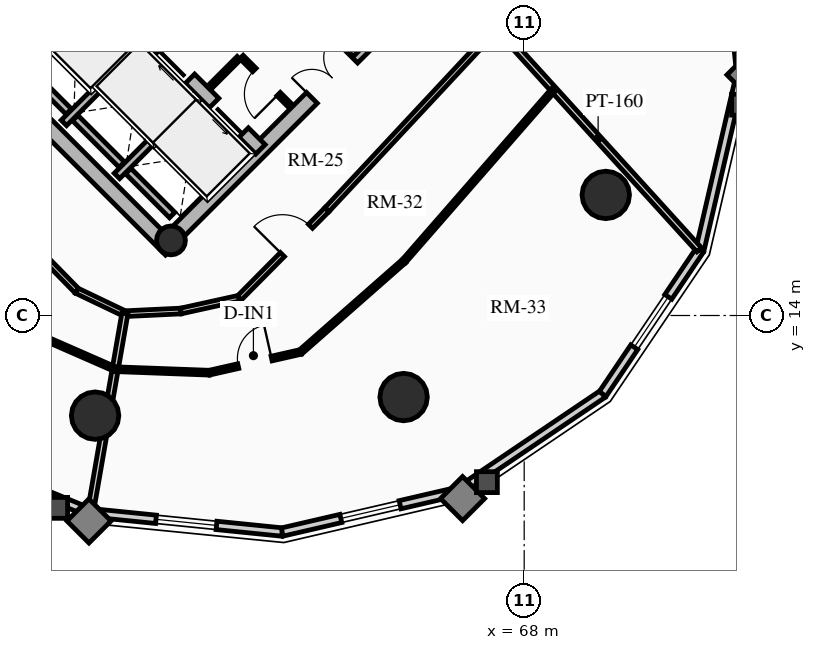
"""IFC4 building model, lengths in metres.
Left out: names, types, materials, properties, quantities, classifications, styles, units other than length and angle.
Written with IfcOpenShell. Run it as: python <this file> out.ifc"""

import sys

from ifc_helpers import new_model, si_unit, direction, frame, frame_2d, origin, origin_2d, place, context, subcontext, project, spatial, rectangle, circle, hollow_circle, extrude, source, transform, mapped, element, fill, save


model = new_model("IFC4")
c1 = context("Model", 3, precision=1e-05, world=origin(), true_north=direction((0.0, 1.0)))
c2 = subcontext(c1, "Body", "Model", "MODEL_VIEW")
j1 = project(units=[si_unit("LENGTHUNIT", "METRE"), si_unit("PLANEANGLEUNIT", "RADIAN")], contexts=[c1])
p1 = place(None, origin())
s1 = spatial("IfcSite", under=j1, at=p1, CompositionType="ELEMENT")
p2 = place(p1, origin())
s2 = spatial("IfcBuilding", under=s1, at=p2, CompositionType="ELEMENT")
p3 = place(p2, frame((0.0, 0.0, 160.33)))
s3 = spatial("IfcBuildingStorey", under=s2, at=p3, CompositionType="ELEMENT", Elevation=160.33)
p4 = place(p3, frame((58.702, 15.732, 0.0), z_axis=(0.0, 0.0, 1.0), x_axis=(-0.707106781187, 0.707106781187, 0.0)))
e1 = element("IfcWall", 1, at=p4, inside=s3, PredefinedType="SHEAR", context=c2, shape_type="SweptSolid", body=[
    extrude(rectangle(XDim=14.1, YDim=0.4, at=frame_2d((7.05, 0.0))), origin(), (0.0, 0.0, 1.0), 2.91),
])
p5 = place(p3, frame((58.561, 15.873, 0.0), z_axis=(0.0, 0.0, 1.0), x_axis=(0.707106781187, 0.707106781187, 0.0)))
e2 = element("IfcWall", 2, at=p5, inside=s3, PredefinedType="SHEAR", context=c2, shape_type="SweptSolid", body=[
    extrude(rectangle(XDim=10.7, YDim=0.4, at=frame_2d((5.35, 0.0))), origin(), (0.0, 0.0, 1.0), 2.91),
])
m1 = source(origin(), c2, "Body", "SweptSolid", [
    extrude(rectangle(XDim=1.5, YDim=2.02, at=frame_2d((0.75, 1.01))), frame((0.0, 0.21, 0.0), z_axis=(0.0, -1.0, 0.0), x_axis=(1.0, 0.0, 0.0)), (0.0, 0.0, 1.0), 0.42),
])
p6 = place(p5, frame((5.45, 0.0, 0.0)))
e3 = element("IfcOpeningElement", 3, at=p6, cuts=e2, PredefinedType="OPENING", context=c2, shape_type="MappedRepresentation", body=[
    mapped(m1, transform((0.0, 0.0, 0.0), x_axis=(1.0, 0.0, 0.0), y_axis=(0.0, 1.0, 0.0), z_axis=(0.0, 0.0, 1.0), scale=1.0)),
])
p7 = place(p3, frame((61.06, 18.373, 0.0), z_axis=(0.0, 0.0, 1.0), x_axis=(-0.707106781187, 0.707106781187, 0.0)))
e4 = element("IfcWall", 4, at=p7, inside=s3, PredefinedType="SHEAR", context=c2, shape_type="SweptSolid", body=[
    extrude(rectangle(XDim=13.7, YDim=0.35, at=frame_2d((6.85, 0.0))), origin(), (0.0, 0.0, 1.0), 2.91),
])
m2 = source(origin(), c2, "Body", "SweptSolid", [
    extrude(rectangle(XDim=1.1, YDim=2.015, at=frame_2d((0.55, 1.007))), frame((0.0, 0.185, 0.0), z_axis=(0.0, -1.0, 0.0), x_axis=(1.0, 0.0, 0.0)), (0.0, 0.0, 1.0), 0.37),
])
p8 = place(p7, frame((4.85, 0.0, 0.0)))
e5 = element("IfcOpeningElement", 5, at=p8, cuts=e4, PredefinedType="OPENING", context=c2, shape_type="MappedRepresentation", body=[
    mapped(m2, transform((0.0, 0.0, 0.0), x_axis=(1.0, 0.0, 0.0), y_axis=(0.0, 1.0, 0.0), z_axis=(0.0, 0.0, 1.0), scale=1.0)),
])
p9 = place(p7, frame((0.625, 0.0, 0.0)))
e6 = element("IfcOpeningElement", 6, at=p9, cuts=e4, PredefinedType="OPENING", context=c2, shape_type="MappedRepresentation", body=[
    mapped(m2, transform((0.0, 0.0, 0.0), x_axis=(1.0, 0.0, 0.0), y_axis=(0.0, 1.0, 0.0), z_axis=(0.0, 0.0, 1.0), scale=1.0)),
])
p10 = place(p7, frame((2.625, 0.0, 0.0)))
e7 = element("IfcOpeningElement", 7, at=p10, cuts=e4, PredefinedType="OPENING", context=c2, shape_type="MappedRepresentation", body=[
    mapped(m2, transform((0.0, 0.0, 0.0), x_axis=(1.0, 0.0, 0.0), y_axis=(0.0, 1.0, 0.0), z_axis=(0.0, 0.0, 1.0), scale=1.0)),
])
m3 = source(origin(), c2, "Body", "SweptSolid", [
    extrude(rectangle(XDim=1.15, YDim=2.02, at=frame_2d((0.575, 1.01))), frame((0.0, 0.185, 0.0), z_axis=(0.0, -1.0, 0.0), x_axis=(1.0, 0.0, 0.0)), (0.0, 0.0, 1.0), 0.37),
])
p11 = place(p7, frame((7.27, 0.0, 0.0)))
e8 = element("IfcOpeningElement", 8, at=p11, cuts=e4, PredefinedType="OPENING", context=c2, shape_type="MappedRepresentation", body=[
    mapped(m3, transform((0.0, 0.0, 0.0), x_axis=(1.0, 0.0, 0.0), y_axis=(0.0, 1.0, 0.0), z_axis=(0.0, 0.0, 1.0), scale=1.0)),
])
p12 = place(p3, frame((63.627, 20.94, 0.0), z_axis=(0.0, 0.0, 1.0), x_axis=(-0.707119496762, 0.707094065383, 0.0)))
e9 = element("IfcWall", 9, at=p12, inside=s3, PredefinedType="SHEAR", context=c2, shape_type="SweptSolid", body=[
    extrude(rectangle(XDim=9.6, YDim=0.35, at=frame_2d((4.8, 0.0))), origin(), (0.0, 0.0, 1.0), 2.91),
])
p13 = place(p12, frame((5.28, 0.0, 0.0)))
e10 = element("IfcOpeningElement", 10, at=p13, cuts=e9, PredefinedType="OPENING", context=c2, shape_type="MappedRepresentation", body=[
    mapped(m3, transform((0.0, 0.0, 0.0), x_axis=(1.0, 0.0, 0.0), y_axis=(0.0, 1.0, 0.0), z_axis=(0.0, 0.0, 1.0), scale=1.0)),
])
p14 = place(p3, frame((53.784, 21.003, 0.0), z_axis=(0.0, 0.0, 1.0), x_axis=(0.707106781187, 0.707106781187, 0.0)))
e11 = element("IfcWall", 11, at=p14, inside=s3, PredefinedType="SHEAR", context=c2, shape_type="SweptSolid", body=[
    extrude(rectangle(XDim=3.285, YDim=0.35, at=frame_2d((1.643, 0.0))), origin(), (0.0, 0.0, 1.0), 2.91),
])
p15 = place(p3, frame((58.706, 15.976, 0.0), z_axis=(0.0, 0.0, 1.0), x_axis=(0.707106781187, 0.707106781187, 0.0)))
e12 = element("IfcColumn", 12, at=p15, inside=s3, PredefinedType="COLUMN", context=c2, shape_type="SweptSolid", body=[
    extrude(hollow_circle(Radius=0.38, WallThickness=0.032, at=origin_2d()), origin(), (0.0, 0.0, 1.0), 2.91),
])
for number, where, z_axis, x_axis in (
    (13, (56.709, 11.365, 0.0), (0.0, 0.0, 1.0), (1.0, 0.0, 0.0)),
    (14, (64.827, 11.854, 0.0), (0.0, 0.0, 1.0), (1.0, 0.0, 0.0)),
    (15, (70.146, 17.173, 0.0), (0.0, 0.0, 1.0), (1.0, 0.0, 0.0)),
):
    element("IfcColumn", number, at=place(p3, frame(where, z_axis=z_axis, x_axis=x_axis)), inside=s3, PredefinedType="USERDEFINED", context=c2, shape_type="SweptSolid", body=[
        extrude(circle(Radius=0.625, at=origin_2d()), origin(), (0.0, 0.0, 1.0), 2.91),
    ])
p16 = place(p3, frame((56.582, 8.811, 0.0), z_axis=(0.0, 0.0, 1.0), x_axis=(-0.924528197738, 0.38111364655, 0.0)))
e16 = element("IfcWall", 16, at=p16, inside=s3, PredefinedType="SOLIDWALL", context=c2, shape_type="SweptSolid", body=[
    extrude(rectangle(XDim=5.366, YDim=0.22, at=frame_2d((2.683, 0.0))), origin(), (0.0, 0.0, 1.0), 2.245),
])
p17 = place(p3, frame((61.633, 8.302, 0.0), z_axis=(0.0, 0.0, 1.0), x_axis=(-0.994959267396, 0.100279889424, 0.0)))
e17 = element("IfcWall", 17, at=p17, inside=s3, PredefinedType="SOLIDWALL", context=c2, shape_type="SweptSolid", body=[
    extrude(rectangle(XDim=5.076, YDim=0.22, at=frame_2d((2.538, 0.0))), origin(), (0.0, 0.0, 1.0), 2.245),
])
m4 = source(origin(), c2, "Body", "SweptSolid", [
    extrude(rectangle(XDim=1.6, YDim=1.3, at=frame_2d((0.8, 0.65))), frame((0.0, 0.12, 0.0), z_axis=(0.0, -1.0, 0.0), x_axis=(1.0, 0.0, 0.0)), (0.0, 0.0, 1.0), 0.24),
])
p18 = place(p17, frame((1.738, 0.0, 0.65)))
e18 = element("IfcOpeningElement", 18, at=p18, cuts=e17, PredefinedType="OPENING", context=c2, shape_type="MappedRepresentation", body=[
    mapped(m4, transform((0.0, 0.0, 0.0), x_axis=(1.0, 0.0, 0.0), y_axis=(0.0, 1.0, 0.0), z_axis=(0.0, 0.0, 1.0), scale=1.0)),
])
p19 = place(p3, frame((66.279, 9.378, 0.0), z_axis=(0.0, 0.0, 1.0), x_axis=(-0.974206226622, -0.225659540039, 0.0)))
e19 = element("IfcWall", 19, at=p19, inside=s3, PredefinedType="SOLIDWALL", context=c2, shape_type="SweptSolid", body=[
    extrude(rectangle(XDim=4.769, YDim=0.22, at=frame_2d((2.385, 0.0))), origin(), (0.0, 0.0, 1.0), 2.245),
])
p20 = place(p19, frame((1.585, 0.0, 0.65)))
e20 = element("IfcOpeningElement", 20, at=p20, cuts=e19, PredefinedType="OPENING", context=c2, shape_type="MappedRepresentation", body=[
    mapped(m4, transform((0.0, 0.0, 0.0), x_axis=(1.0, 0.0, 0.0), y_axis=(0.0, 1.0, 0.0), z_axis=(0.0, 0.0, 1.0), scale=1.0)),
])
p21 = place(p3, frame((70.065, 11.935, 0.0), z_axis=(0.0, 0.0, 1.0), x_axis=(-0.828739009952, -0.559635286042, 0.0)))
e21 = element("IfcWall", 21, at=p21, inside=s3, PredefinedType="SOLIDWALL", context=c2, shape_type="SweptSolid", body=[
    extrude(rectangle(XDim=4.569, YDim=0.22, at=frame_2d((2.284, 0.0))), origin(), (0.0, 0.0, 1.0), 2.245),
])
p22 = place(p3, frame((72.622, 15.721, 0.0), z_axis=(0.0, 0.0, 1.0), x_axis=(-0.559635286042, -0.828739009952, 0.0)))
e22 = element("IfcWall", 22, at=p22, inside=s3, PredefinedType="SOLIDWALL", context=c2, shape_type="SweptSolid", body=[
    extrude(rectangle(XDim=4.569, YDim=0.22, at=frame_2d((2.284, 0.0))), origin(), (0.0, 0.0, 1.0), 2.245),
])
p23 = place(p22, frame((1.484, 0.0, 0.65)))
e23 = element("IfcOpeningElement", 23, at=p23, cuts=e22, PredefinedType="OPENING", context=c2, shape_type="MappedRepresentation", body=[
    mapped(m4, transform((0.0, 0.0, 0.0), x_axis=(1.0, 0.0, 0.0), y_axis=(0.0, 1.0, 0.0), z_axis=(0.0, 0.0, 1.0), scale=1.0)),
])
p24 = place(p3, frame((73.698, 20.367, 0.0), z_axis=(0.0, 0.0, 1.0), x_axis=(-0.225659540039, -0.974206226622, 0.0)))
e24 = element("IfcWall", 24, at=p24, inside=s3, PredefinedType="SOLIDWALL", context=c2, shape_type="SweptSolid", body=[
    extrude(rectangle(XDim=4.769, YDim=0.22, at=frame_2d((2.385, 0.0))), origin(), (0.0, 0.0, 1.0), 2.245),
])
p25 = place(p3, frame((73.189, 25.418, 0.0), z_axis=(0.0, 0.0, 1.0), x_axis=(0.100279889424, -0.994959267396, 0.0)))
e25 = element("IfcWall", 25, at=p25, inside=s3, PredefinedType="SOLIDWALL", context=c2, shape_type="SweptSolid", body=[
    extrude(rectangle(XDim=5.076, YDim=0.22, at=frame_2d((2.538, 0.0))), origin(), (0.0, 0.0, 1.0), 2.245),
])
m5 = source(origin(), c2, "Body", "SweptSolid", [
    extrude(rectangle(XDim=1.15, YDim=2.005, at=frame_2d((0.575, 1.002))), frame((0.0, 0.12, 0.0), z_axis=(0.0, -1.0, 0.0), x_axis=(1.0, 0.0, 0.0)), (0.0, 0.0, 1.0), 0.24),
])
p26 = place(p25, frame((1.963, 0.0, 0.0)))
e26 = element("IfcOpeningElement", 26, at=p26, cuts=e25, PredefinedType="OPENING", context=c2, shape_type="MappedRepresentation", body=[
    mapped(m5, transform((0.0, 0.0, 0.0), x_axis=(1.0, 0.0, 0.0), y_axis=(0.0, 1.0, 0.0), z_axis=(0.0, 0.0, 1.0), scale=1.0)),
])
p27 = place(p3, frame((55.888, 19.069, 0.0), z_axis=(0.0, 0.0, 1.0), x_axis=(0.707106781187, 0.707106781187, 0.0)))
e27 = element("IfcWall", 27, at=p27, inside=s3, PredefinedType="SHEAR", context=c2, shape_type="SweptSolid", body=[
    extrude(rectangle(XDim=2.97, YDim=0.2, at=frame_2d((1.485, 0.0))), origin(), (0.0, 0.0, 1.0), 2.91),
])
p28 = place(p3, frame((56.015, 19.366, 0.0), z_axis=(0.0, 0.0, 1.0), x_axis=(-0.707106781187, 0.707106781187, 0.0)))
e28 = element("IfcWall", 28, at=p28, inside=s3, PredefinedType="SHEAR", context=c2, shape_type="SweptSolid", body=[
    extrude(rectangle(XDim=2.44, YDim=0.2, at=frame_2d((1.22, 0.0))), origin(), (0.0, 0.0, 1.0), 2.91),
])
p29 = place(p3, frame((57.284, 17.673, 0.0), z_axis=(0.0, 0.0, 1.0), x_axis=(0.707147878904, 0.70706568108, 0.0)))
e29 = element("IfcWall", 29, at=p29, inside=s3, PredefinedType="SHEAR", context=c2, shape_type="SweptSolid", body=[
    extrude(rectangle(XDim=2.97, YDim=0.2, at=frame_2d((1.485, 0.0))), origin(), (0.0, 0.0, 1.0), 2.91),
])
p30 = place(p3, frame((57.412, 17.97, 0.0), z_axis=(0.0, 0.0, 1.0), x_axis=(-0.707106781187, 0.707106781187, 0.0)))
e30 = element("IfcWall", 30, at=p30, inside=s3, PredefinedType="SHEAR", context=c2, shape_type="SweptSolid", body=[
    extrude(rectangle(XDim=1.735, YDim=0.2, at=frame_2d((0.867, 0.0))), origin(), (0.0, 0.0, 1.0), 2.91),
])
p31 = place(p3, frame((58.737, 16.644, 0.0), z_axis=(0.0, 0.0, 1.0), x_axis=(-0.707032117043, 0.707181437447, 0.0)))
e31 = element("IfcWall", 31, at=p31, inside=s3, PredefinedType="SHEAR", context=c2, shape_type="SweptSolid", body=[
    extrude(rectangle(XDim=1.635, YDim=0.2, at=frame_2d((0.817, 0.0))), origin(), (0.0, 0.0, 1.0), 2.91),
])
p32 = place(p3, frame((61.835, 19.529, 0.0), z_axis=(0.0, 0.0, 1.0), x_axis=(-0.707174592913, 0.707038962956, 0.0)))
e32 = element("IfcWall", 32, at=p32, inside=s3, PredefinedType="PARTITIONING", context=c2, shape_type="SweptSolid", body=[
    extrude(rectangle(XDim=1.8, YDim=0.125, at=frame_2d((0.9, 0.0))), origin(), (0.0, 0.0, 1.0), 2.675),
])
m6 = source(origin(), c2, "Body", "SweptSolid", [
    extrude(rectangle(XDim=0.9, YDim=2.005, at=frame_2d((0.45, 1.002))), frame((0.0, 0.073, 0.0), z_axis=(0.0, -1.0, 0.0), x_axis=(1.0, 0.0, 0.0)), (0.0, 0.0, 1.0), 0.145),
])
p33 = place(p32, frame((0.42, 0.0, 0.0)))
e33 = element("IfcOpeningElement", 33, at=p33, cuts=e32, PredefinedType="OPENING", context=c2, shape_type="MappedRepresentation", body=[
    mapped(m6, transform((0.0, 0.0, 0.0), x_axis=(1.0, 0.0, 0.0), y_axis=(0.0, 1.0, 0.0), z_axis=(0.0, 0.0, 1.0), scale=1.0)),
])
p34 = place(p3, frame((59.713, 19.996, 0.0), z_axis=(0.0, 0.0, 1.0), x_axis=(0.707217726, 0.706995818963, 0.0)))
e34 = element("IfcWall", 34, at=p34, inside=s3, PredefinedType="PARTITIONING", context=c2, shape_type="SweptSolid", body=[
    extrude(rectangle(XDim=1.1, YDim=0.125, at=frame_2d((0.55, 0.0))), origin(), (0.0, 0.0, 1.0), 2.675),
])
p35 = place(p3, frame((51.985, 18.985, 0.0), z_axis=(0.0, 0.0, 1.0), x_axis=(0.699619654291, -0.714515457726, 0.0)))
e35 = element("IfcWall", 35, at=p35, inside=s3, PredefinedType="PARTITIONING", context=c2, shape_type="SweptSolid", body=[
    extrude(rectangle(XDim=6.064, YDim=0.15, at=frame_2d((3.032, 0.0))), origin(), (0.0, 0.0, 1.0), 2.245),
])
m7 = source(origin(), c2, "Body", "SweptSolid", [
    extrude(rectangle(XDim=1.05, YDim=2.015, at=frame_2d((0.525, 1.007))), frame((0.0, 0.085, 0.0), z_axis=(0.0, -1.0, 0.0), x_axis=(1.0, 0.0, 0.0)), (0.0, 0.0, 1.0), 0.17),
])
p36 = place(p35, frame((2.507, 0.0, 0.0)))
e36 = element("IfcOpeningElement", 36, at=p36, cuts=e35, PredefinedType="OPENING", context=c2, shape_type="MappedRepresentation", body=[
    mapped(m7, transform((0.0, 0.0, 0.0), x_axis=(1.0, 0.0, 0.0), y_axis=(0.0, 1.0, 0.0), z_axis=(0.0, 0.0, 1.0), scale=1.0)),
])
p37 = place(p3, frame((56.227, 14.652, 0.0), z_axis=(0.0, 0.0, 1.0), x_axis=(0.902364039563, -0.430974639745, 0.0)))
e37 = element("IfcWall", 37, at=p37, inside=s3, PredefinedType="PARTITIONING", context=c2, shape_type="SweptSolid", body=[
    extrude(rectangle(XDim=1.401, YDim=0.15, at=frame_2d((0.701, 0.0))), origin(), (0.0, 0.0, 1.0), 2.245),
])
p38 = place(p3, frame((57.492, 14.048, 0.0), z_axis=(0.0, 0.0, 1.0), x_axis=(0.99885011351, 0.047942160364, 0.0)))
e38 = element("IfcWall", 38, at=p38, inside=s3, PredefinedType="PARTITIONING", context=c2, shape_type="SweptSolid", body=[
    extrude(rectangle(XDim=1.477, YDim=0.15, at=frame_2d((0.738, 0.0))), origin(), (0.0, 0.0, 1.0), 2.245),
])
p39 = place(p3, frame((58.967, 14.118, 0.0), z_axis=(0.0, 0.0, 1.0), x_axis=(0.976471358036, 0.215647135235, 0.0)))
e39 = element("IfcWall", 39, at=p39, inside=s3, PredefinedType="PARTITIONING", context=c2, shape_type="SweptSolid", body=[
    extrude(rectangle(XDim=1.571, YDim=0.15, at=frame_2d((0.786, 0.0))), origin(), (0.0, 0.0, 1.0), 2.245),
])
p40 = place(p3, frame((60.501, 14.457, 0.0), z_axis=(0.0, 0.0, 1.0), x_axis=(0.704012266258, 0.710187812454, 0.0)))
e40 = element("IfcWall", 40, at=p40, inside=s3, PredefinedType="PARTITIONING", context=c2, shape_type="SweptSolid", body=[
    extrude(rectangle(XDim=3.281, YDim=0.15, at=frame_2d((1.641, 0.0))), origin(), (0.0, 0.0, 1.0), 2.245),
])
p41 = place(p40, frame((1.614, 0.0, 0.0)))
e41 = element("IfcOpeningElement", 41, at=p41, cuts=e40, PredefinedType="OPENING", context=c2, shape_type="MappedRepresentation", body=[
    mapped(m7, transform((0.0, 0.0, 0.0), x_axis=(1.0, 0.0, 0.0), y_axis=(0.0, 1.0, 0.0), z_axis=(0.0, 0.0, 1.0), scale=1.0)),
])
p42 = place(p3, frame((62.812, 16.788, 0.0), z_axis=(0.0, 0.0, 1.0), x_axis=(0.682323555485, 0.731050316757, 0.0)))
e42 = element("IfcWall", 42, at=p42, inside=s3, PredefinedType="PARTITIONING", context=c2, shape_type="SweptSolid", body=[
    extrude(rectangle(XDim=6.559, YDim=0.15, at=frame_2d((3.279, 0.0))), origin(), (0.0, 0.0, 1.0), 2.245),
])
p43 = place(p3, frame((57.492, 14.048, 0.0), z_axis=(0.0, 0.0, 1.0), x_axis=(-0.171191349619, -0.985237799628, 0.0)))
e43 = element("IfcWall", 43, at=p43, inside=s3, PredefinedType="PARTITIONING", context=c2, shape_type="SweptSolid", body=[
    extrude(rectangle(XDim=5.295, YDim=0.16, at=frame_2d((2.647, 0.0))), origin(), (0.0, 0.0, 1.0), 2.245),
])
p44 = place(p3, frame((67.287, 21.582, 0.0), z_axis=(0.0, 0.0, 1.0), x_axis=(0.672520632772, -0.740078373212, 0.0)))
e44 = element("IfcWall", 44, at=p44, inside=s3, PredefinedType="PARTITIONING", context=c2, shape_type="SweptSolid", body=[
    extrude(rectangle(XDim=7.907, YDim=0.16, at=frame_2d((3.954, 0.0))), origin(), (0.0, 0.0, 1.0), 2.245),
])
p45 = place(p3, frame((54.94, 13.594, 0.0), z_axis=(0.0, 0.0, 1.0), x_axis=(0.915898070967, -0.401410916143, 0.0)))
e45 = element("IfcWall", 45, at=p45, inside=s3, PredefinedType="PARTITIONING", context=c2, shape_type="SweptSolid", body=[
    extrude(rectangle(XDim=2.509, YDim=0.125, at=frame_2d((1.254, 0.0))), origin(), (0.0, 0.0, 1.0), 2.245),
])
p46 = place(p3, frame((57.238, 12.587, 0.0), z_axis=(0.0, 0.0, 1.0), x_axis=(0.999316318576, -0.036971548882, 0.0)))
e46 = element("IfcWall", 46, at=p46, inside=s3, PredefinedType="PARTITIONING", context=c2, shape_type="SweptSolid", body=[
    extrude(rectangle(XDim=2.476, YDim=0.125, at=frame_2d((1.238, 0.0))), origin(), (0.0, 0.0, 1.0), 2.245),
])
p47 = place(p3, frame((59.713, 12.495, 0.0), z_axis=(0.0, 0.0, 1.0), x_axis=(0.975260144608, 0.221060286662, 0.0)))
e47 = element("IfcWall", 47, at=p47, inside=s3, PredefinedType="PARTITIONING", context=c2, shape_type="SweptSolid", body=[
    extrude(rectangle(XDim=2.465, YDim=0.125, at=frame_2d((1.232, 0.0))), origin(), (0.0, 0.0, 1.0), 2.245),
])
p48 = place(p47, frame((0.782, 0.0, 0.0)))
e48 = element("IfcOpeningElement", 48, at=p48, cuts=e47, PredefinedType="OPENING", context=c2, shape_type="MappedRepresentation", body=[
    mapped(m6, transform((0.0, 0.0, 0.0), x_axis=(1.0, 0.0, 0.0), y_axis=(0.0, 1.0, 0.0), z_axis=(0.0, 0.0, 1.0), scale=1.0)),
])
p49 = place(p3, frame((62.117, 13.04, 0.0), z_axis=(0.0, 0.0, 1.0), x_axis=(0.751084924077, 0.660205601933, 0.0)))
e49 = element("IfcWall", 49, at=p49, inside=s3, PredefinedType="PARTITIONING", context=c2, shape_type="SweptSolid", body=[
    extrude(rectangle(XDim=3.624, YDim=0.125, at=frame_2d((1.812, 0.0))), origin(), (0.0, 0.0, 1.0), 2.245),
])
p50 = place(p3, frame((64.839, 15.433, 0.0), z_axis=(0.0, 0.0, 1.0), x_axis=(0.657505208165, 0.753449999161, 0.0)))
e50 = element("IfcWall", 50, at=p50, inside=s3, PredefinedType="PARTITIONING", context=c2, shape_type="SweptSolid", body=[
    extrude(rectangle(XDim=5.988, YDim=0.125, at=frame_2d((2.994, 0.0))), origin(), (0.0, 0.0, 1.0), 2.245),
])
m8 = source(origin(), c2, "Body", "SweptSolid", [
    extrude(rectangle(XDim=1.6, YDim=1.3, at=frame_2d((0.8, 0.65))), frame((0.0, 0.03, 0.0), z_axis=(0.0, -1.0, 0.0), x_axis=(1.0, 0.0, 0.0)), (0.0, 0.0, 1.0), 0.06),
])
p51 = place(p18, origin())
e51 = element("IfcWindow", 51, at=p51, inside=s3, PartitioningType="SINGLE_PANEL", PredefinedType="WINDOW", context=c2, shape_type="MappedRepresentation", body=[
    mapped(m8, transform((0.0, 0.0, 0.0), x_axis=(1.0, 0.0, 0.0), y_axis=(0.0, 1.0, 0.0), z_axis=(0.0, 0.0, 1.0), scale=1.0)),
])
fill(e18, e51)
p52 = place(p20, origin())
e52 = element("IfcWindow", 52, at=p52, inside=s3, PartitioningType="SINGLE_PANEL", PredefinedType="WINDOW", context=c2, shape_type="MappedRepresentation", body=[
    mapped(m8, transform((0.0, 0.0, 0.0), x_axis=(1.0, 0.0, 0.0), y_axis=(0.0, 1.0, 0.0), z_axis=(0.0, 0.0, 1.0), scale=1.0)),
])
fill(e20, e52)
p53 = place(p23, origin())
e53 = element("IfcWindow", 53, at=p53, inside=s3, PartitioningType="SINGLE_PANEL", PredefinedType="WINDOW", context=c2, shape_type="MappedRepresentation", body=[
    mapped(m8, transform((0.0, 0.0, 0.0), x_axis=(1.0, 0.0, 0.0), y_axis=(0.0, 1.0, 0.0), z_axis=(0.0, 0.0, 1.0), scale=1.0)),
])
fill(e23, e53)
m9 = source(origin(), c2, "Body", "SweptSolid", [
    extrude(rectangle(XDim=1.1, YDim=2.015, at=frame_2d((0.55, 1.007))), frame((0.0, 0.025, 0.0), z_axis=(0.0, -1.0, 0.0), x_axis=(1.0, 0.0, 0.0)), (0.0, 0.0, 1.0), 0.05),
])
p54 = place(p9, origin())
e54 = element("IfcDoor", 54, at=p54, inside=s3, OperationType="SLIDING_TO_LEFT", PredefinedType="DOOR", context=c2, shape_type="MappedRepresentation", body=[
    mapped(m9, transform((0.0, 0.0, 0.0), x_axis=(1.0, 0.0, 0.0), y_axis=(0.0, 1.0, 0.0), z_axis=(0.0, 0.0, 1.0), scale=1.0)),
])
fill(e6, e54)
p55 = place(p10, origin())
e55 = element("IfcDoor", 55, at=p55, inside=s3, OperationType="SLIDING_TO_RIGHT", PredefinedType="DOOR", context=c2, shape_type="MappedRepresentation", body=[
    mapped(m9, transform((0.0, 0.0, 0.0), x_axis=(1.0, 0.0, 0.0), y_axis=(0.0, 1.0, 0.0), z_axis=(0.0, 0.0, 1.0), scale=1.0)),
])
fill(e7, e55)
m10 = source(origin(), c2, "Body", "SweptSolid", [
    extrude(rectangle(XDim=1.5, YDim=2.02, at=frame_2d((0.75, 1.01))), frame((0.0, 0.025, 0.0), z_axis=(0.0, -1.0, 0.0), x_axis=(1.0, 0.0, 0.0)), (0.0, 0.0, 1.0), 0.05),
])
p56 = place(p6, origin())
e56 = element("IfcDoor", 56, at=p56, inside=s3, OperationType="DOUBLE_DOOR_SINGLE_SWING", PredefinedType="DOOR", context=c2, shape_type="MappedRepresentation", body=[
    mapped(m10, transform((0.0, 0.0, 0.0), x_axis=(1.0, 0.0, 0.0), y_axis=(0.0, 1.0, 0.0), z_axis=(0.0, 0.0, 1.0), scale=1.0)),
])
fill(e3, e56)
m11 = source(origin(), c2, "Body", "SweptSolid", [
    extrude(rectangle(XDim=0.9, YDim=2.005, at=frame_2d((0.45, 1.002))), frame((0.0, 0.025, 0.0), z_axis=(0.0, -1.0, 0.0), x_axis=(1.0, 0.0, 0.0)), (0.0, 0.0, 1.0), 0.05),
])
p57 = place(p33, origin())
e57 = element("IfcDoor", 57, at=p57, inside=s3, OperationType="SINGLE_SWING_LEFT", PredefinedType="DOOR", context=c2, shape_type="MappedRepresentation", body=[
    mapped(m11, transform((0.0, 0.0, 0.0), x_axis=(1.0, 0.0, 0.0), y_axis=(0.0, 1.0, 0.0), z_axis=(0.0, 0.0, 1.0), scale=1.0)),
])
fill(e33, e57)
m12 = source(origin(), c2, "Body", "SweptSolid", [
    extrude(rectangle(XDim=1.05, YDim=2.015, at=frame_2d((0.525, 1.007))), frame((0.0, 0.025, 0.0), z_axis=(0.0, -1.0, 0.0), x_axis=(1.0, 0.0, 0.0)), (0.0, 0.0, 1.0), 0.05),
])
p58 = place(p41, origin())
e58 = element("IfcDoor", 58, at=p58, inside=s3, OperationType="SINGLE_SWING_LEFT", PredefinedType="DOOR", context=c2, shape_type="MappedRepresentation", body=[
    mapped(m12, transform((0.0, 0.0, 0.0), x_axis=(1.0, 0.0, 0.0), y_axis=(0.0, 1.0, 0.0), z_axis=(0.0, 0.0, 1.0), scale=1.0)),
])
fill(e41, e58)
p59 = place(p48, origin())
e59 = element("IfcDoor", 59, at=p59, inside=s3, OperationType="SINGLE_SWING_RIGHT", PredefinedType="DOOR", context=c2, shape_type="MappedRepresentation", body=[
    mapped(m11, transform((0.0, 0.0, 0.0), x_axis=(1.0, 0.0, 0.0), y_axis=(0.0, 1.0, 0.0), z_axis=(0.0, 0.0, 1.0), scale=1.0)),
])
fill(e48, e59)
save(model, sys.argv[1])
